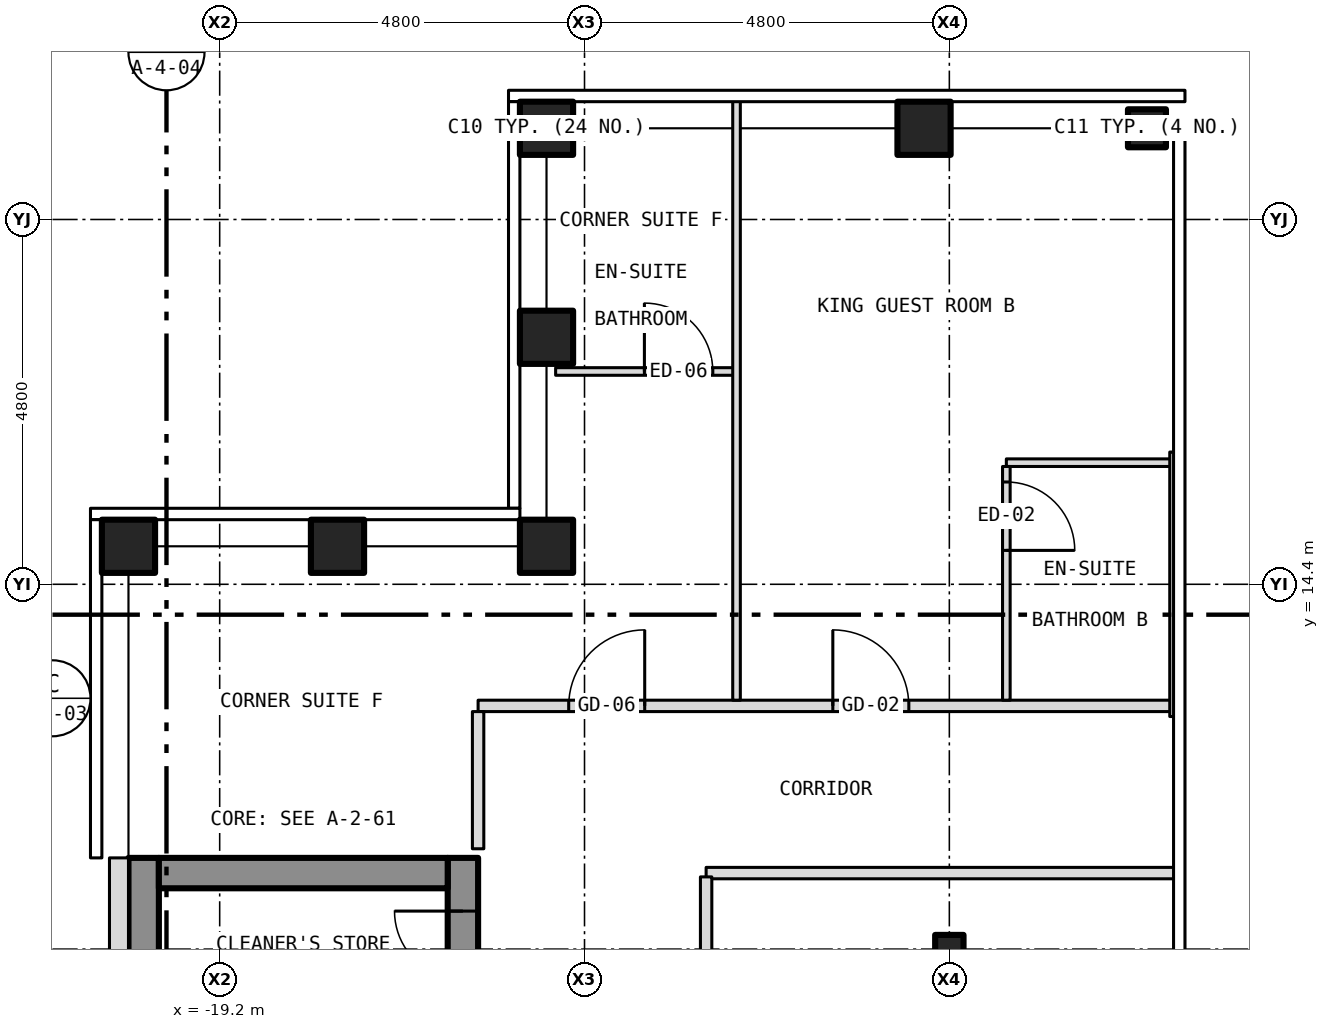
"""IFC4 building model, lengths in metres.
Left out: names, types, materials, properties, quantities, classifications, styles, units other than length and angle.
Written with IfcOpenShell. Run it as: python <this file> out.ifc"""

import sys

from ifc_helpers import new_model, si_unit, direction, frame, frame_2d, origin, origin_2d, place, context, subcontext, project, spatial, rectangle, hollow_rectangle, i_section, extrude, element, fill, save


model = new_model("IFC4")
c1 = context("Model", 3, precision=1e-05, world=origin(), true_north=direction((0.0, 1.0)))
c2 = subcontext(c1, "Body", "Model", "MODEL_VIEW")
j1 = project(units=[si_unit("LENGTHUNIT", "METRE"), si_unit("PLANEANGLEUNIT", "RADIAN")], contexts=[c1])
p1 = place(None, origin())
s1 = spatial("IfcSite", under=j1, at=p1, CompositionType="ELEMENT")
p2 = place(p1, origin())
s2 = spatial("IfcBuilding", under=s1, at=p2, CompositionType="ELEMENT")
p3 = place(p2, frame((0.0, 0.0, 222.5)))
s3 = spatial("IfcBuildingStorey", under=s2, at=p3, CompositionType="ELEMENT", Elevation=222.5)
for number, where, z_axis, x_axis in (
    (1, (-14.9, 20.4, -0.15), (0.0, 0.0, 1.0), (1.0, 0.0, 0.0)),
    (2, (-9.933, 20.4, -0.15), (0.0, 0.0, 1.0), (1.0, 0.0, 0.0)),
    (3, (-20.4, 14.9, -0.15), (0.0, 0.0, 1.0), (1.0, 0.0, 0.0)),
    (4, (-14.9, 14.9, -0.15), (0.0, 0.0, 1.0), (1.0, 0.0, 0.0)),
    (5, (-14.9, 17.65, -0.15), (0.0, 0.0, 1.0), (1.0, 0.0, 0.0)),
    (6, (-17.65, 14.9, -0.15), (0.0, 0.0, 1.0), (1.0, 0.0, 0.0)),
):
    element("IfcColumn", number, at=place(p3, frame(where, z_axis=z_axis, x_axis=x_axis)), inside=s3, PredefinedType="COLUMN", context=c2, shape_type="SweptSolid", body=[
        extrude(hollow_rectangle(XDim=0.7, YDim=0.7, WallThickness=0.04, at=origin_2d()), origin(), (0.0, 0.0, 1.0), 3.5),
    ])
p4 = place(p3, frame((-7.0, 20.4, -0.15), z_axis=(0.0, 0.0, 1.0), x_axis=(1.0, 0.0, 0.0)))
e7 = element("IfcColumn", 7, at=p4, inside=s3, PredefinedType="COLUMN", context=c2, shape_type="SweptSolid", body=[
    extrude(hollow_rectangle(XDim=0.5, YDim=0.5, WallThickness=0.03, at=origin_2d()), origin(), (0.0, 0.0, 1.0), 3.5),
])
p5 = place(p3, frame((-9.6, 9.6, -0.15), z_axis=(0.0, 0.0, 1.0), x_axis=(1.0, 0.0, 0.0)))
e8 = element("IfcColumn", 8, at=p5, inside=s3, PredefinedType="COLUMN", context=c2, shape_type="SweptSolid", body=[
    extrude(i_section(OverallWidth=0.373, OverallDepth=0.373, WebThickness=0.016, FlangeThickness=0.026, at=origin_2d()), origin(), (0.0, 0.0, 1.0), 3.5),
])
p6 = place(p3, frame((-16.0, -10.8, 0.0), z_axis=(0.0, 0.0, 1.0), x_axis=(0.0, 1.0, 0.0)))
e9 = element("IfcWall", 9, at=p6, inside=s3, PredefinedType="SHEAR", context=c2, shape_type="SweptSolid", body=[
    extrude(rectangle(XDim=21.6, YDim=0.4, at=frame_2d((10.8, 0.0))), origin(), (0.0, 0.0, 1.0), 3.25),
])
p7 = place(p6, frame((9.4, 0.0, 0.0)))
e10 = element("IfcOpeningElement", 10, at=p7, cuts=e9, PredefinedType="OPENING", context=c2, shape_type="SweptSolid", body=[
    extrude(rectangle(XDim=1.1, YDim=2.1, at=frame_2d((0.55, 1.05))), frame((0.0, 0.212, 0.0), z_axis=(0.0, -1.0, 0.0), x_axis=(1.0, 0.0, 0.0)), (0.0, 0.0, 1.0), 0.424),
])
p8 = place(p6, frame((11.5, 0.0, 0.0)))
e11 = element("IfcOpeningElement", 11, at=p8, cuts=e9, PredefinedType="OPENING", context=c2, shape_type="SweptSolid", body=[
    extrude(rectangle(XDim=1.1, YDim=2.1, at=frame_2d((0.55, 1.05))), frame((0.0, 0.212, 0.0), z_axis=(0.0, -1.0, 0.0), x_axis=(1.0, 0.0, 0.0)), (0.0, 0.0, 1.0), 0.424),
])
p9 = place(p6, frame((13.6, 0.0, 0.0)))
e12 = element("IfcOpeningElement", 12, at=p9, cuts=e9, PredefinedType="OPENING", context=c2, shape_type="SweptSolid", body=[
    extrude(rectangle(XDim=1.1, YDim=2.1, at=frame_2d((0.55, 1.05))), frame((0.0, 0.212, 0.0), z_axis=(0.0, -1.0, 0.0), x_axis=(1.0, 0.0, 0.0)), (0.0, 0.0, 1.0), 0.424),
])
p10 = place(p6, frame((15.7, 0.0, 0.0)))
e13 = element("IfcOpeningElement", 13, at=p10, cuts=e9, PredefinedType="OPENING", context=c2, shape_type="SweptSolid", body=[
    extrude(rectangle(XDim=1.1, YDim=2.1, at=frame_2d((0.55, 1.05))), frame((0.0, 0.212, 0.0), z_axis=(0.0, -1.0, 0.0), x_axis=(1.0, 0.0, 0.0)), (0.0, 0.0, 1.0), 0.424),
])
p11 = place(p6, frame((17.8, 0.0, 0.0)))
e14 = element("IfcOpeningElement", 14, at=p11, cuts=e9, PredefinedType="OPENING", context=c2, shape_type="SweptSolid", body=[
    extrude(rectangle(XDim=1.1, YDim=2.1, at=frame_2d((0.55, 1.05))), frame((0.0, 0.212, 0.0), z_axis=(0.0, -1.0, 0.0), x_axis=(1.0, 0.0, 0.0)), (0.0, 0.0, 1.0), 0.424),
])
p12 = place(p6, frame((0.458, 0.0, 0.0)))
e15 = element("IfcOpeningElement", 15, at=p12, cuts=e9, PredefinedType="OPENING", context=c2, shape_type="SweptSolid", body=[
    extrude(rectangle(XDim=1.1, YDim=2.1, at=frame_2d((0.55, 1.05))), frame((0.0, 0.212, 0.0), z_axis=(0.0, -1.0, 0.0), x_axis=(1.0, 0.0, 0.0)), (0.0, 0.0, 1.0), 0.424),
])
p13 = place(p6, frame((7.5, 0.0, 0.0)))
e16 = element("IfcOpeningElement", 16, at=p13, cuts=e9, PredefinedType="OPENING", context=c2, shape_type="SweptSolid", body=[
    extrude(rectangle(XDim=1.1, YDim=2.1, at=frame_2d((0.55, 1.05))), frame((0.0, 0.212, 0.0), z_axis=(0.0, -1.0, 0.0), x_axis=(1.0, 0.0, 0.0)), (0.0, 0.0, 1.0), 0.424),
])
p14 = place(p6, frame((20.0, 0.0, 0.0)))
e17 = element("IfcOpeningElement", 17, at=p14, cuts=e9, PredefinedType="OPENING", context=c2, shape_type="SweptSolid", body=[
    extrude(rectangle(XDim=0.9, YDim=2.1, at=frame_2d((0.45, 1.05))), frame((0.0, 0.212, 0.0), z_axis=(0.0, -1.0, 0.0), x_axis=(1.0, 0.0, 0.0)), (0.0, 0.0, 1.0), 0.424),
])
p15 = place(p3, frame((-20.2, -10.8, 0.0), z_axis=(0.0, 0.0, 1.0), x_axis=(0.0, 1.0, 0.0)))
e18 = element("IfcWall", 18, at=p15, inside=s3, PredefinedType="SHEAR", context=c2, shape_type="SweptSolid", body=[
    extrude(rectangle(XDim=21.6, YDim=0.4, at=frame_2d((10.8, 0.0))), origin(), (0.0, 0.0, 1.0), 3.25),
])
p16 = place(p3, frame((-20.0, 10.6, 0.0), z_axis=(0.0, 0.0, 1.0), x_axis=(1.0, 0.0, 0.0)))
e19 = element("IfcWall", 19, at=p16, inside=s3, PredefinedType="SHEAR", context=c2, shape_type="SweptSolid", body=[
    extrude(rectangle(XDim=3.8, YDim=0.4, at=frame_2d((1.9, 0.0))), origin(), (0.0, 0.0, 1.0), 3.25),
])
p17 = place(p3, frame((-20.525, 10.8, 0.0), z_axis=(0.0, 0.0, 1.0), x_axis=(0.0, -1.0, 0.0)))
e20 = element("IfcWall", 20, at=p17, inside=s3, PredefinedType="SOLIDWALL", context=c2, shape_type="SweptSolid", body=[
    extrude(rectangle(XDim=21.6, YDim=0.25, at=frame_2d((10.8, 0.0))), origin(), (0.0, 0.0, 1.0), 3.5),
])
p18 = place(p17, frame((18.05, 0.0, 1.0)))
e21 = element("IfcOpeningElement", 21, at=p18, cuts=e20, PredefinedType="OPENING", context=c2, shape_type="SweptSolid", body=[
    extrude(rectangle(XDim=0.6, YDim=1.5, at=frame_2d((0.3, 0.75))), frame((0.0, 0.137, 0.0), z_axis=(0.0, -1.0, 0.0), x_axis=(1.0, 0.0, 0.0)), (0.0, 0.0, 1.0), 0.274),
])
p19 = place(p3, frame((-12.8, 10.6, 0.0), z_axis=(0.0, 0.0, 1.0), x_axis=(1.0, 0.0, 0.0)))
e22 = element("IfcWall", 22, at=p19, inside=s3, PredefinedType="PARTITIONING", context=c2, shape_type="SweptSolid", body=[
    extrude(rectangle(XDim=6.18, YDim=0.15, at=frame_2d((3.09, 0.0))), origin(), (0.0, 0.0, 1.0), 3.35),
])
p20 = place(p3, frame((-15.8, 12.8, 0.0), z_axis=(0.0, 0.0, 1.0), x_axis=(1.0, 0.0, 0.0)))
e23 = element("IfcWall", 23, at=p20, inside=s3, PredefinedType="PARTITIONING", context=c2, shape_type="SweptSolid", body=[
    extrude(rectangle(XDim=9.15, YDim=0.15, at=frame_2d((4.575, 0.0))), origin(), (0.0, 0.0, 1.0), 3.35),
])
p21 = place(p20, frame((4.667, 0.0, 0.0)))
e24 = element("IfcOpeningElement", 24, at=p21, cuts=e23, PredefinedType="OPENING", context=c2, shape_type="SweptSolid", body=[
    extrude(rectangle(XDim=1.0, YDim=2.1, at=frame_2d((0.5, 1.05))), frame((0.0, 0.087, 0.0), z_axis=(0.0, -1.0, 0.0), x_axis=(1.0, 0.0, 0.0)), (0.0, 0.0, 1.0), 0.174),
])
p22 = place(p20, frame((1.192, 0.0, 0.0)))
e25 = element("IfcOpeningElement", 25, at=p22, cuts=e23, PredefinedType="OPENING", context=c2, shape_type="SweptSolid", body=[
    extrude(rectangle(XDim=1.0, YDim=2.1, at=frame_2d((0.5, 1.05))), frame((0.0, 0.087, 0.0), z_axis=(0.0, -1.0, 0.0), x_axis=(1.0, 0.0, 0.0)), (0.0, 0.0, 1.0), 0.174),
])
p23 = place(p3, frame((-8.85, 16.0, 0.0), z_axis=(0.0, 0.0, 1.0), x_axis=(1.0, 0.0, 0.0)))
e26 = element("IfcWall", 26, at=p23, inside=s3, PredefinedType="PARTITIONING", context=c2, shape_type="SweptSolid", body=[
    extrude(rectangle(XDim=2.2, YDim=0.1, at=frame_2d((1.1, 0.0))), origin(), (0.0, 0.0, 1.0), 3.35),
])
p24 = place(p3, frame((-14.78, 17.2, 0.0), z_axis=(0.0, 0.0, 1.0), x_axis=(1.0, 0.0, 0.0)))
e27 = element("IfcWall", 27, at=p24, inside=s3, PredefinedType="PARTITIONING", context=c2, shape_type="SweptSolid", body=[
    extrude(rectangle(XDim=2.38, YDim=0.1, at=frame_2d((1.19, 0.0))), origin(), (0.0, 0.0, 1.0), 3.35),
])
p25 = place(p24, frame((1.168, 0.0, 0.0)))
e28 = element("IfcOpeningElement", 28, at=p25, cuts=e27, PredefinedType="OPENING", context=c2, shape_type="SweptSolid", body=[
    extrude(rectangle(XDim=0.9, YDim=2.1, at=frame_2d((0.45, 1.05))), frame((0.0, 0.062, 0.0), z_axis=(0.0, -1.0, 0.0), x_axis=(1.0, 0.0, 0.0)), (0.0, 0.0, 1.0), 0.124),
])
p26 = place(p3, frame((-15.8, 10.92, 0.0), z_axis=(0.0, 0.0, 1.0), x_axis=(0.0, 1.0, 0.0)))
e29 = element("IfcWall", 29, at=p26, inside=s3, PredefinedType="PARTITIONING", context=c2, shape_type="SweptSolid", body=[
    extrude(rectangle(XDim=1.805, YDim=0.15, at=frame_2d((0.903, 0.0))), origin(), (0.0, 0.0, 1.0), 3.35),
])
p27 = place(p3, frame((-12.8, 3.375, 0.0), z_axis=(0.0, 0.0, 1.0), x_axis=(0.0, 1.0, 0.0)))
e30 = element("IfcWall", 30, at=p27, inside=s3, PredefinedType="PARTITIONING", context=c2, shape_type="SweptSolid", body=[
    extrude(rectangle(XDim=7.175, YDim=0.15, at=frame_2d((3.587, 0.0))), origin(), (0.0, 0.0, 1.0), 3.35),
])
p28 = place(p27, frame((3.125, 0.0, 0.0)))
e31 = element("IfcOpeningElement", 31, at=p28, cuts=e30, PredefinedType="OPENING", context=c2, shape_type="SweptSolid", body=[
    extrude(rectangle(XDim=0.9, YDim=2.1, at=frame_2d((0.45, 1.05))), frame((0.0, 0.087, 0.0), z_axis=(0.0, -1.0, 0.0), x_axis=(1.0, 0.0, 0.0)), (0.0, 0.0, 1.0), 0.174),
])
p29 = place(p3, frame((-12.4, 12.875, 0.0), z_axis=(0.0, 0.0, 1.0), x_axis=(0.0, 1.0, 0.0)))
e32 = element("IfcWall", 32, at=p29, inside=s3, PredefinedType="PARTITIONING", context=c2, shape_type="SweptSolid", body=[
    extrude(rectangle(XDim=7.905, YDim=0.1, at=frame_2d((3.953, 0.0))), origin(), (0.0, 0.0, 1.0), 3.35),
])
p30 = place(p3, frame((-8.85, 12.875, 0.0), z_axis=(0.0, 0.0, 1.0), x_axis=(0.0, 1.0, 0.0)))
e33 = element("IfcWall", 33, at=p30, inside=s3, PredefinedType="PARTITIONING", context=c2, shape_type="SweptSolid", body=[
    extrude(rectangle(XDim=3.075, YDim=0.1, at=frame_2d((1.538, 0.0))), origin(), (0.0, 0.0, 1.0), 3.35),
])
p31 = place(p30, frame((1.971, 0.0, 0.0)))
e34 = element("IfcOpeningElement", 34, at=p31, cuts=e33, PredefinedType="OPENING", context=c2, shape_type="SweptSolid", body=[
    extrude(rectangle(XDim=0.9, YDim=2.1, at=frame_2d((0.45, 1.05))), frame((0.0, 0.062, 0.0), z_axis=(0.0, -1.0, 0.0), x_axis=(1.0, 0.0, 0.0)), (0.0, 0.0, 1.0), 0.124),
])
p32 = place(p3, frame((-6.65, 12.66, 0.0), z_axis=(0.0, 0.0, 1.0), x_axis=(0.0, 1.0, 0.0)))
e35 = element("IfcWall", 35, at=p32, inside=s3, PredefinedType="PARTITIONING", context=c2, shape_type="SweptSolid", body=[
    extrude(rectangle(XDim=3.48, YDim=0.1, at=frame_2d((1.74, 0.0))), origin(), (0.0, 0.0, 1.0), 3.35),
])
p33 = place(p14, origin())
e36 = element("IfcDoor", 36, at=p33, inside=s3, OperationType="SINGLE_SWING_RIGHT", PredefinedType="DOOR", context=c2, shape_type="SweptSolid", body=[
    extrude(rectangle(XDim=0.9, YDim=2.1, at=frame_2d((0.45, 1.05))), frame((0.0, 0.025, 0.0), z_axis=(0.0, -1.0, 0.0), x_axis=(1.0, 0.0, 0.0)), (0.0, 0.0, 1.0), 0.05),
])
fill(e17, e36)
p34 = place(p21, origin())
e37 = element("IfcDoor", 37, at=p34, inside=s3, OperationType="SINGLE_SWING_LEFT", PredefinedType="DOOR", context=c2, shape_type="SweptSolid", body=[
    extrude(rectangle(XDim=1.0, YDim=2.1, at=frame_2d((0.5, 1.05))), frame((0.0, 0.025, 0.0), z_axis=(0.0, -1.0, 0.0), x_axis=(1.0, 0.0, 0.0)), (0.0, 0.0, 1.0), 0.05),
])
fill(e24, e37)
p35 = place(p31, origin())
e38 = element("IfcDoor", 38, at=p35, inside=s3, OperationType="SINGLE_SWING_LEFT", PredefinedType="DOOR", context=c2, shape_type="SweptSolid", body=[
    extrude(rectangle(XDim=0.9, YDim=2.1, at=frame_2d((0.45, 1.05))), frame((0.0, 0.025, 0.0), z_axis=(0.0, -1.0, 0.0), x_axis=(1.0, 0.0, 0.0)), (0.0, 0.0, 1.0), 0.05),
])
fill(e34, e38)
p36 = place(p25, origin())
e39 = element("IfcDoor", 39, at=p36, inside=s3, OperationType="SINGLE_SWING_LEFT", PredefinedType="DOOR", context=c2, shape_type="SweptSolid", body=[
    extrude(rectangle(XDim=0.9, YDim=2.1, at=frame_2d((0.45, 1.05))), frame((0.0, 0.025, 0.0), z_axis=(0.0, -1.0, 0.0), x_axis=(1.0, 0.0, 0.0)), (0.0, 0.0, 1.0), 0.05),
])
fill(e28, e39)
p37 = place(p22, origin())
e40 = element("IfcDoor", 40, at=p37, inside=s3, OperationType="SINGLE_SWING_RIGHT", PredefinedType="DOOR", context=c2, shape_type="SweptSolid", body=[
    extrude(rectangle(XDim=1.0, YDim=2.1, at=frame_2d((0.5, 1.05))), frame((0.0, 0.025, 0.0), z_axis=(0.0, -1.0, 0.0), x_axis=(1.0, 0.0, 0.0)), (0.0, 0.0, 1.0), 0.05),
])
fill(e25, e40)
save(model, sys.argv[1])
